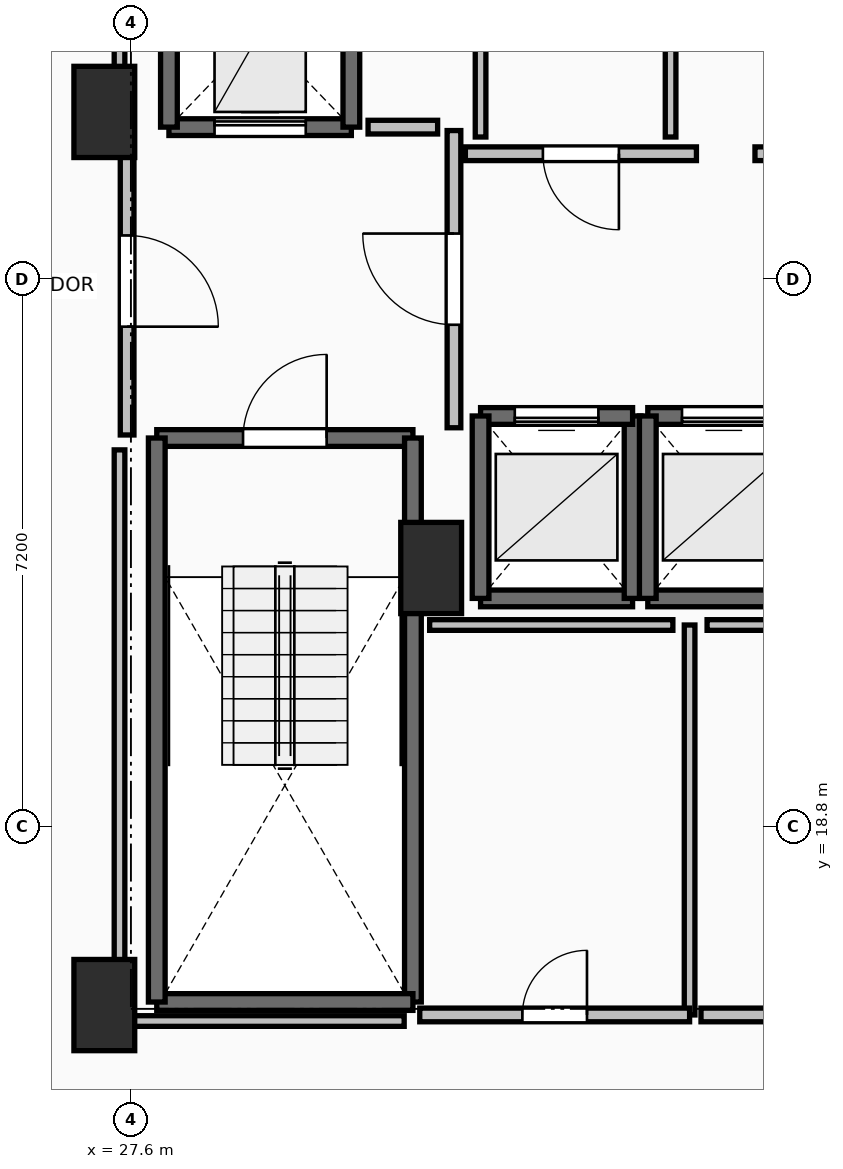
"""IFC4 building model, lengths in metres.
Left out: names, types, materials, properties, quantities, classifications, styles, units other than length and angle.
Written with IfcOpenShell. Run it as: python <this file> out.ifc"""

import sys

from ifc_helpers import new_model, si_unit, direction, frame, frame_2d, origin, origin_2d, place, context, subcontext, project, spatial, rectangle, extrude, element, fill, save


model = new_model("IFC4")
c1 = context("Model", 3, precision=1e-05, world=origin(), true_north=direction((0.0, 1.0)))
c2 = subcontext(c1, "Body", "Model", "MODEL_VIEW")
j1 = project(units=[si_unit("LENGTHUNIT", "METRE"), si_unit("PLANEANGLEUNIT", "RADIAN")], contexts=[c1])
p1 = place(None, origin())
s1 = spatial("IfcSite", under=j1, at=p1, CompositionType="ELEMENT")
p2 = place(p1, origin())
s2 = spatial("IfcBuilding", under=s1, at=p2, CompositionType="ELEMENT")
p3 = place(p2, frame((0.0, 0.0, 129.1)))
s3 = spatial("IfcBuildingStorey", under=s2, at=p3, CompositionType="ELEMENT", Elevation=129.1)
for number, where, z_axis, x_axis in (
    (1, (27.25, 16.45, 0.0), (0.0, 0.0, 1.0), (1.0, 0.0, 0.0)),
    (2, (27.25, 28.2, 0.0), (0.0, 0.0, 1.0), (1.0, 0.0, 0.0)),
    (3, (31.55, 22.2, 0.0), (0.0, 0.0, 1.0), (1.0, 0.0, 0.0)),
):
    element("IfcColumn", number, at=place(p3, frame(where, z_axis=z_axis, x_axis=x_axis)), inside=s3, PredefinedType="PILASTER", context=c2, shape_type="SweptSolid", body=[
        extrude(rectangle(XDim=0.8, YDim=1.2, at=origin_2d()), origin(), (0.0, 0.0, 1.0), 3.5),
    ])
p4 = place(p3, frame((27.94, 23.91, 0.0), z_axis=(0.0, 0.0, 1.0), x_axis=(1.0, 0.0, 0.0)))
e4 = element("IfcWall", 4, at=p4, inside=s3, PredefinedType="SOLIDWALL", context=c2, shape_type="SweptSolid", body=[
    extrude(rectangle(XDim=3.37, YDim=0.22, at=frame_2d((1.685, 0.0))), origin(), (0.0, 0.0, 1.0), 3.24),
])
p5 = place(p4, frame((1.135, 0.0, 0.0)))
e5 = element("IfcOpeningElement", 5, at=p5, cuts=e4, PredefinedType="OPENING", context=c2, shape_type="SweptSolid", body=[
    extrude(rectangle(XDim=1.1, YDim=2.15, at=frame_2d((0.55, 1.075))), frame((0.0, 0.125, 0.0), z_axis=(0.0, -1.0, 0.0), x_axis=(1.0, 0.0, 0.0)), (0.0, 0.0, 1.0), 0.25),
])
p6 = place(p3, frame((31.31, 23.91, 0.0), z_axis=(0.0, 0.0, 1.0), x_axis=(0.0, -1.0, 0.0)))
e6 = element("IfcWall", 6, at=p6, inside=s3, PredefinedType="SOLIDWALL", context=c2, shape_type="SweptSolid", body=[
    extrude(rectangle(XDim=7.42, YDim=0.22, at=frame_2d((3.71, 0.0))), origin(), (0.0, 0.0, 1.0), 3.24),
])
p7 = place(p3, frame((31.31, 16.49, 0.0), z_axis=(0.0, 0.0, 1.0), x_axis=(-1.0, 0.0, 0.0)))
e7 = element("IfcWall", 7, at=p7, inside=s3, PredefinedType="SOLIDWALL", context=c2, shape_type="SweptSolid", body=[
    extrude(rectangle(XDim=3.37, YDim=0.22, at=frame_2d((1.685, 0.0))), origin(), (0.0, 0.0, 1.0), 3.24),
])
p8 = place(p3, frame((27.94, 16.49, 0.0), z_axis=(0.0, 0.0, 1.0), x_axis=(0.0, 1.0, 0.0)))
e8 = element("IfcWall", 8, at=p8, inside=s3, PredefinedType="SOLIDWALL", context=c2, shape_type="SweptSolid", body=[
    extrude(rectangle(XDim=7.42, YDim=0.22, at=frame_2d((3.71, 0.0))), origin(), (0.0, 0.0, 1.0), 3.24),
])
p9 = place(p3, frame((32.2, 21.8, 0.0), z_axis=(0.0, 0.0, 1.0), x_axis=(1.0, 0.0, 0.0)))
e9 = element("IfcWall", 9, at=p9, inside=s3, PredefinedType="SOLIDWALL", context=c2, shape_type="SweptSolid", body=[
    extrude(rectangle(XDim=2.0, YDim=0.22, at=frame_2d((1.0, 0.0))), origin(), (0.0, 0.0, 1.0), 3.24),
])
p10 = place(p3, frame((34.2, 21.8, 0.0), z_axis=(0.0, 0.0, 1.0), x_axis=(0.0, 1.0, 0.0)))
e10 = element("IfcWall", 10, at=p10, inside=s3, PredefinedType="SOLIDWALL", context=c2, shape_type="SweptSolid", body=[
    extrude(rectangle(XDim=2.4, YDim=0.22, at=frame_2d((1.2, 0.0))), origin(), (0.0, 0.0, 1.0), 3.24),
])
p11 = place(p3, frame((34.2, 24.2, 0.0), z_axis=(0.0, 0.0, 1.0), x_axis=(-1.0, 0.0, 0.0)))
e11 = element("IfcWall", 11, at=p11, inside=s3, PredefinedType="SOLIDWALL", context=c2, shape_type="SweptSolid", body=[
    extrude(rectangle(XDim=2.0, YDim=0.22, at=frame_2d((1.0, 0.0))), origin(), (0.0, 0.0, 1.0), 3.24),
])
p12 = place(p11, frame((0.45, 0.0, 0.0)))
e12 = element("IfcOpeningElement", 12, at=p12, cuts=e11, PredefinedType="OPENING", context=c2, shape_type="SweptSolid", body=[
    extrude(rectangle(XDim=1.1, YDim=2.2, at=frame_2d((0.55, 1.1))), frame((0.0, 0.125, 0.0), z_axis=(0.0, -1.0, 0.0), x_axis=(1.0, 0.0, 0.0)), (0.0, 0.0, 1.0), 0.25),
])
p13 = place(p3, frame((32.2, 24.2, 0.0), z_axis=(0.0, 0.0, 1.0), x_axis=(0.0, -1.0, 0.0)))
e13 = element("IfcWall", 13, at=p13, inside=s3, PredefinedType="SOLIDWALL", context=c2, shape_type="SweptSolid", body=[
    extrude(rectangle(XDim=2.4, YDim=0.22, at=frame_2d((1.2, 0.0))), origin(), (0.0, 0.0, 1.0), 3.24),
])
p14 = place(p3, frame((34.4, 21.8, 0.0), z_axis=(0.0, 0.0, 1.0), x_axis=(1.0, 0.0, 0.0)))
e14 = element("IfcWall", 14, at=p14, inside=s3, PredefinedType="SOLIDWALL", context=c2, shape_type="SweptSolid", body=[
    extrude(rectangle(XDim=2.0, YDim=0.22, at=frame_2d((1.0, 0.0))), origin(), (0.0, 0.0, 1.0), 3.24),
])
p15 = place(p3, frame((36.4, 24.2, 0.0), z_axis=(0.0, 0.0, 1.0), x_axis=(-1.0, 0.0, 0.0)))
e15 = element("IfcWall", 15, at=p15, inside=s3, PredefinedType="SOLIDWALL", context=c2, shape_type="SweptSolid", body=[
    extrude(rectangle(XDim=2.0, YDim=0.22, at=frame_2d((1.0, 0.0))), origin(), (0.0, 0.0, 1.0), 3.24),
])
p16 = place(p15, frame((0.45, 0.0, 0.0)))
e16 = element("IfcOpeningElement", 16, at=p16, cuts=e15, PredefinedType="OPENING", context=c2, shape_type="SweptSolid", body=[
    extrude(rectangle(XDim=1.1, YDim=2.2, at=frame_2d((0.55, 1.1))), frame((0.0, 0.125, 0.0), z_axis=(0.0, -1.0, 0.0), x_axis=(1.0, 0.0, 0.0)), (0.0, 0.0, 1.0), 0.25),
])
p17 = place(p3, frame((34.4, 24.2, 0.0), z_axis=(0.0, 0.0, 1.0), x_axis=(0.0, -1.0, 0.0)))
e17 = element("IfcWall", 17, at=p17, inside=s3, PredefinedType="SOLIDWALL", context=c2, shape_type="SweptSolid", body=[
    extrude(rectangle(XDim=2.4, YDim=0.22, at=frame_2d((1.2, 0.0))), origin(), (0.0, 0.0, 1.0), 3.24),
])
p18 = place(p3, frame((28.1, 28.0, 0.0), z_axis=(0.0, 0.0, 1.0), x_axis=(1.0, 0.0, 0.0)))
e18 = element("IfcWall", 18, at=p18, inside=s3, PredefinedType="SHEAR", context=c2, shape_type="SweptSolid", body=[
    extrude(rectangle(XDim=2.4, YDim=0.22, at=frame_2d((1.2, 0.0))), origin(), (0.0, 0.0, 1.0), 3.24),
])
p19 = place(p18, frame((0.6, 0.0, 0.0)))
e19 = element("IfcOpeningElement", 19, at=p19, cuts=e18, PredefinedType="OPENING", context=c2, shape_type="SweptSolid", body=[
    extrude(rectangle(XDim=1.2, YDim=2.2, at=frame_2d((0.6, 1.1))), frame((0.0, 0.125, 0.0), z_axis=(0.0, -1.0, 0.0), x_axis=(1.0, 0.0, 0.0)), (0.0, 0.0, 1.0), 0.25),
])
for number, where, z_axis, x_axis in (
    (20, (30.5, 28.0, 0.0), (0.0, 0.0, 1.0), (0.0, 1.0, 0.0)),
    (21, (28.1, 30.5, 0.0), (0.0, 0.0, 1.0), (0.0, -1.0, 0.0)),
):
    element("IfcWall", number, at=place(p3, frame(where, z_axis=z_axis, x_axis=x_axis)), inside=s3, PredefinedType="SHEAR", context=c2, shape_type="SweptSolid", body=[
        extrude(rectangle(XDim=2.5, YDim=0.22, at=frame_2d((1.25, 0.0))), origin(), (0.0, 0.0, 1.0), 3.24),
    ])
p20 = place(p3, frame((31.85, 24.045, 0.0), z_axis=(0.0, 0.0, 1.0), x_axis=(0.0, 1.0, 0.0)))
e22 = element("IfcWall", 22, at=p20, inside=s3, PredefinedType="PARTITIONING", context=c2, shape_type="SweptSolid", body=[
    extrude(rectangle(XDim=3.91, YDim=0.18, at=frame_2d((1.955, 0.0))), origin(), (0.0, 0.0, 1.0), 3.24),
])
p21 = place(p20, frame((1.355, 0.0, 0.0)))
e23 = element("IfcOpeningElement", 23, at=p21, cuts=e22, PredefinedType="OPENING", context=c2, shape_type="SweptSolid", body=[
    extrude(rectangle(XDim=1.2, YDim=2.15, at=frame_2d((0.6, 1.075))), frame((0.0, 0.105, 0.0), z_axis=(0.0, -1.0, 0.0), x_axis=(1.0, 0.0, 0.0)), (0.0, 0.0, 1.0), 0.21),
])
p22 = place(p3, frame((27.55, 28.0, 0.0), z_axis=(0.0, 0.0, 1.0), x_axis=(0.0, -1.0, 0.0)))
e24 = element("IfcWall", 24, at=p22, inside=s3, PredefinedType="PARTITIONING", context=c2, shape_type="SweptSolid", body=[
    extrude(rectangle(XDim=4.05, YDim=0.18, at=frame_2d((2.025, 0.0))), origin(), (0.0, 0.0, 1.0), 3.24),
])
p23 = place(p22, frame((1.425, 0.0, 0.0)))
e25 = element("IfcOpeningElement", 25, at=p23, cuts=e24, PredefinedType="OPENING", context=c2, shape_type="SweptSolid", body=[
    extrude(rectangle(XDim=1.2, YDim=2.15, at=frame_2d((0.6, 1.075))), frame((0.0, 0.105, 0.0), z_axis=(0.0, -1.0, 0.0), x_axis=(1.0, 0.0, 0.0)), (0.0, 0.0, 1.0), 0.21),
])
p24 = place(p3, frame((35.04, 27.65, 0.0), z_axis=(0.0, 0.0, 1.0), x_axis=(-1.0, 0.0, 0.0)))
e26 = element("IfcWall", 26, at=p24, inside=s3, PredefinedType="PARTITIONING", context=c2, shape_type="SweptSolid", body=[
    extrude(rectangle(XDim=3.04, YDim=0.18, at=frame_2d((1.52, 0.0))), origin(), (0.0, 0.0, 1.0), 3.24),
])
p25 = place(p24, frame((1.02, 0.0, 0.0)))
e27 = element("IfcOpeningElement", 27, at=p25, cuts=e26, PredefinedType="OPENING", context=c2, shape_type="SweptSolid", body=[
    extrude(rectangle(XDim=1.0, YDim=2.15, at=frame_2d((0.5, 1.075))), frame((0.0, 0.105, 0.0), z_axis=(0.0, -1.0, 0.0), x_axis=(1.0, 0.0, 0.0)), (0.0, 0.0, 1.0), 0.21),
])
p26 = place(p3, frame((39.19, 27.65, 0.0), z_axis=(0.0, 0.0, 1.0), x_axis=(-1.0, 0.0, 0.0)))
e28 = element("IfcWall", 28, at=p26, inside=s3, PredefinedType="PARTITIONING", context=c2, shape_type="SweptSolid", body=[
    extrude(rectangle(XDim=3.38, YDim=0.18, at=frame_2d((1.69, 0.0))), origin(), (0.0, 0.0, 1.0), 3.24),
])
p27 = place(p26, frame((1.265, 0.0, 0.0)))
e29 = element("IfcOpeningElement", 29, at=p27, cuts=e28, PredefinedType="OPENING", context=c2, shape_type="SweptSolid", body=[
    extrude(rectangle(XDim=0.85, YDim=2.1, at=frame_2d((0.425, 1.05))), frame((0.0, 0.105, 0.0), z_axis=(0.0, -1.0, 0.0), x_axis=(1.0, 0.0, 0.0)), (0.0, 0.0, 1.0), 0.21),
])
p28 = place(p3, frame((34.95, 16.32, 0.0), z_axis=(0.0, 0.0, 1.0), x_axis=(0.0, 1.0, 0.0)))
e30 = element("IfcWall", 30, at=p28, inside=s3, PredefinedType="PARTITIONING", context=c2, shape_type="SweptSolid", body=[
    extrude(rectangle(XDim=5.13, YDim=0.14, at=frame_2d((2.565, 0.0))), origin(), (0.0, 0.0, 1.0), 3.24),
])
p29 = place(p3, frame((31.4, 16.32, 0.0), z_axis=(0.0, 0.0, 1.0), x_axis=(1.0, 0.0, 0.0)))
e31 = element("IfcWall", 31, at=p29, inside=s3, PredefinedType="PARTITIONING", context=c2, shape_type="SweptSolid", body=[
    extrude(rectangle(XDim=3.55, YDim=0.18, at=frame_2d((1.775, 0.0))), origin(), (0.0, 0.0, 1.0), 3.24),
])
p30 = place(p29, frame((1.35, 0.0, 0.0)))
e32 = element("IfcOpeningElement", 32, at=p30, cuts=e31, PredefinedType="OPENING", context=c2, shape_type="SweptSolid", body=[
    extrude(rectangle(XDim=0.85, YDim=2.1, at=frame_2d((0.425, 1.05))), frame((0.0, 0.105, 0.0), z_axis=(0.0, -1.0, 0.0), x_axis=(1.0, 0.0, 0.0)), (0.0, 0.0, 1.0), 0.21),
])
p31 = place(p3, frame((35.1, 16.32, 0.0), z_axis=(0.0, 0.0, 1.0), x_axis=(1.0, 0.0, 0.0)))
e33 = element("IfcWall", 33, at=p31, inside=s3, PredefinedType="PARTITIONING", context=c2, shape_type="SweptSolid", body=[
    extrude(rectangle(XDim=3.7, YDim=0.18, at=frame_2d((1.85, 0.0))), origin(), (0.0, 0.0, 1.0), 3.24),
])
p32 = place(p31, frame((1.35, 0.0, 0.0)))
e34 = element("IfcOpeningElement", 34, at=p32, cuts=e33, PredefinedType="OPENING", context=c2, shape_type="SweptSolid", body=[
    extrude(rectangle(XDim=1.0, YDim=2.15, at=frame_2d((0.5, 1.075))), frame((0.0, 0.105, 0.0), z_axis=(0.0, -1.0, 0.0), x_axis=(1.0, 0.0, 0.0)), (0.0, 0.0, 1.0), 0.21),
])
p33 = place(p3, frame((31.635, 28.0, 0.0), z_axis=(0.0, 0.0, 1.0), x_axis=(-1.0, 0.0, 0.0)))
e35 = element("IfcWall", 35, at=p33, inside=s3, PredefinedType="PARTITIONING", context=c2, shape_type="SweptSolid", body=[
    extrude(rectangle(XDim=0.915, YDim=0.18, at=frame_2d((0.458, 0.0))), origin(), (0.0, 0.0, 1.0), 3.24),
])
p34 = place(p3, frame((34.73, 21.45, 0.0), z_axis=(0.0, 0.0, 1.0), x_axis=(-1.0, 0.0, 0.0)))
e36 = element("IfcWall", 36, at=p34, inside=s3, PredefinedType="PARTITIONING", context=c2, shape_type="SweptSolid", body=[
    extrude(rectangle(XDim=3.2, YDim=0.14, at=frame_2d((1.6, 0.0))), origin(), (0.0, 0.0, 1.0), 3.24),
])
p35 = place(p3, frame((36.439, 21.45, 0.0), z_axis=(0.0, 0.0, 1.0), x_axis=(-1.0, 0.0, 0.0)))
e37 = element("IfcWall", 37, at=p35, inside=s3, PredefinedType="PARTITIONING", context=c2, shape_type="SweptSolid", body=[
    extrude(rectangle(XDim=1.259, YDim=0.14, at=frame_2d((0.629, 0.0))), origin(), (0.0, 0.0, 1.0), 3.24),
])
for number, where, z_axis, x_axis in (
    (38, (32.2, 30.26, 0.0), (0.0, 0.0, 1.0), (0.0, -1.0, 0.0)),
    (39, (34.7, 27.87, 0.0), (0.0, 0.0, 1.0), (0.0, 1.0, 0.0)),
):
    element("IfcWall", number, at=place(p3, frame(where, z_axis=z_axis, x_axis=x_axis)), inside=s3, PredefinedType="PARTITIONING", context=c2, shape_type="SweptSolid", body=[
        extrude(rectangle(XDim=2.39, YDim=0.14, at=frame_2d((1.195, 0.0))), origin(), (0.0, 0.0, 1.0), 3.24),
    ])
p36 = place(p3, frame((27.45, 33.45, 0.0), z_axis=(0.0, 0.0, 1.0), x_axis=(0.0, -1.0, 0.0)))
e40 = element("IfcWall", 40, at=p36, inside=s3, PredefinedType="PARTITIONING", context=c2, shape_type="SweptSolid", body=[
    extrude(rectangle(XDim=5.254, YDim=0.14, at=frame_2d((2.627, 0.0))), origin(), (0.0, 0.0, 1.0), 2.432),
])
p37 = place(p3, frame((27.45, 23.754, 0.0), z_axis=(0.0, 0.0, 1.0), x_axis=(0.0, -1.0, 0.0)))
e41 = element("IfcWall", 41, at=p37, inside=s3, PredefinedType="PARTITIONING", context=c2, shape_type="SweptSolid", body=[
    extrude(rectangle(XDim=7.514, YDim=0.14, at=frame_2d((3.757, 0.0))), origin(), (0.0, 0.0, 1.0), 2.432),
])
p38 = place(p3, frame((27.45, 16.24, 0.0), z_axis=(0.0, 0.0, 1.0), x_axis=(1.0, 0.0, 0.0)))
e42 = element("IfcWall", 42, at=p38, inside=s3, PredefinedType="PARTITIONING", context=c2, shape_type="SweptSolid", body=[
    extrude(rectangle(XDim=3.745, YDim=0.14, at=frame_2d((1.873, 0.0))), origin(), (0.0, 0.0, 1.0), 2.432),
])
p39 = place(p5, origin())
e43 = element("IfcDoor", 43, at=p39, inside=s3, OperationType="SINGLE_SWING_RIGHT", PredefinedType="DOOR", context=c2, shape_type="SweptSolid", body=[
    extrude(rectangle(XDim=1.1, YDim=2.15, at=frame_2d((0.55, 1.075))), frame((0.0, 0.025, 0.0), z_axis=(0.0, -1.0, 0.0), x_axis=(1.0, 0.0, 0.0)), (0.0, 0.0, 1.0), 0.05),
])
fill(e5, e43)
p40 = place(p12, origin())
e44 = element("IfcDoor", 44, at=p40, inside=s3, OperationType="SLIDING_TO_LEFT", PredefinedType="DOOR", context=c2, shape_type="SweptSolid", body=[
    extrude(rectangle(XDim=1.1, YDim=2.2, at=frame_2d((0.55, 1.1))), frame((0.0, 0.025, 0.0), z_axis=(0.0, -1.0, 0.0), x_axis=(1.0, 0.0, 0.0)), (0.0, 0.0, 1.0), 0.05),
])
fill(e12, e44)
p41 = place(p16, origin())
e45 = element("IfcDoor", 45, at=p41, inside=s3, OperationType="SLIDING_TO_LEFT", PredefinedType="DOOR", context=c2, shape_type="SweptSolid", body=[
    extrude(rectangle(XDim=1.1, YDim=2.2, at=frame_2d((0.55, 1.1))), frame((0.0, 0.025, 0.0), z_axis=(0.0, -1.0, 0.0), x_axis=(1.0, 0.0, 0.0)), (0.0, 0.0, 1.0), 0.05),
])
fill(e16, e45)
p42 = place(p19, origin())
e46 = element("IfcDoor", 46, at=p42, inside=s3, OperationType="SLIDING_TO_LEFT", PredefinedType="DOOR", context=c2, shape_type="SweptSolid", body=[
    extrude(rectangle(XDim=1.2, YDim=2.2, at=frame_2d((0.6, 1.1))), frame((0.0, 0.025, 0.0), z_axis=(0.0, -1.0, 0.0), x_axis=(1.0, 0.0, 0.0)), (0.0, 0.0, 1.0), 0.05),
])
fill(e19, e46)
p43 = place(p21, origin())
e47 = element("IfcDoor", 47, at=p43, inside=s3, OperationType="SINGLE_SWING_RIGHT", PredefinedType="DOOR", context=c2, shape_type="SweptSolid", body=[
    extrude(rectangle(XDim=1.2, YDim=2.15, at=frame_2d((0.6, 1.075))), frame((0.0, 0.025, 0.0), z_axis=(0.0, -1.0, 0.0), x_axis=(1.0, 0.0, 0.0)), (0.0, 0.0, 1.0), 0.05),
])
fill(e23, e47)
p44 = place(p23, origin())
e48 = element("IfcDoor", 48, at=p44, inside=s3, OperationType="SINGLE_SWING_RIGHT", PredefinedType="DOOR", context=c2, shape_type="SweptSolid", body=[
    extrude(rectangle(XDim=1.2, YDim=2.15, at=frame_2d((0.6, 1.075))), frame((0.0, 0.025, 0.0), z_axis=(0.0, -1.0, 0.0), x_axis=(1.0, 0.0, 0.0)), (0.0, 0.0, 1.0), 0.05),
])
fill(e25, e48)
p45 = place(p25, origin())
e49 = element("IfcDoor", 49, at=p45, inside=s3, OperationType="SINGLE_SWING_LEFT", PredefinedType="DOOR", context=c2, shape_type="SweptSolid", body=[
    extrude(rectangle(XDim=1.0, YDim=2.15, at=frame_2d((0.5, 1.075))), frame((0.0, 0.025, 0.0), z_axis=(0.0, -1.0, 0.0), x_axis=(1.0, 0.0, 0.0)), (0.0, 0.0, 1.0), 0.05),
])
fill(e27, e49)
p46 = place(p30, origin())
e50 = element("IfcDoor", 50, at=p46, inside=s3, OperationType="SINGLE_SWING_RIGHT", PredefinedType="DOOR", context=c2, shape_type="SweptSolid", body=[
    extrude(rectangle(XDim=0.85, YDim=2.1, at=frame_2d((0.425, 1.05))), frame((0.0, 0.025, 0.0), z_axis=(0.0, -1.0, 0.0), x_axis=(1.0, 0.0, 0.0)), (0.0, 0.0, 1.0), 0.05),
])
fill(e32, e50)
save(model, sys.argv[1])
